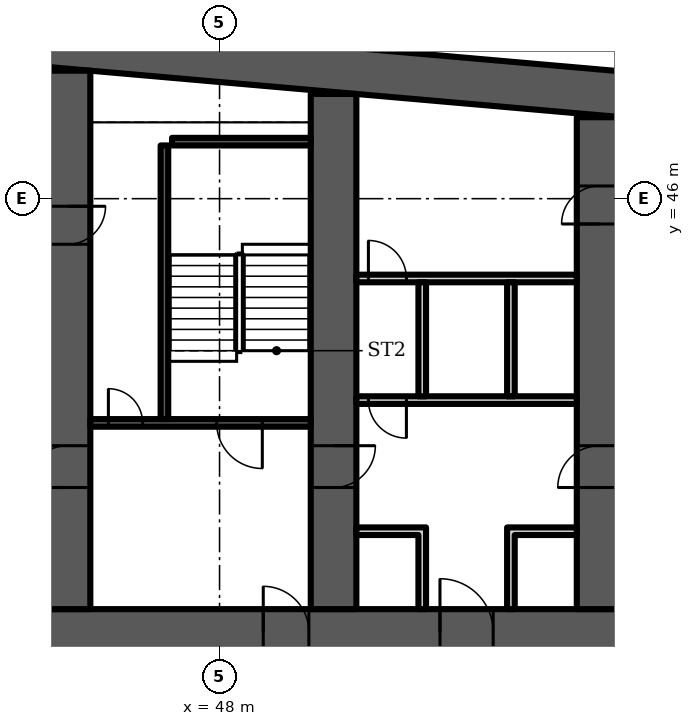
"""IFC4 building model, lengths in metres.
Left out: names, types, materials, properties, quantities, classifications, styles, units other than length and angle.
Written with IfcOpenShell. Run it as: python <this file> out.ifc"""

import sys

from ifc_helpers import new_model, si_unit, direction, frame, frame_2d, origin, place, context, subcontext, project, spatial, polyline, rectangle, outline, extrude, element, fill, save


model = new_model("IFC4")
c1 = context("Model", 3, precision=1e-05, world=origin(), true_north=direction((0.0, 1.0)))
c2 = subcontext(c1, "Body", "Model", "MODEL_VIEW")
j1 = project(units=[si_unit("LENGTHUNIT", "METRE"), si_unit("PLANEANGLEUNIT", "RADIAN")], contexts=[c1])
p1 = place(None, origin())
s1 = spatial("IfcSite", under=j1, at=p1, CompositionType="ELEMENT")
p2 = place(p1, origin())
s2 = spatial("IfcBuilding", under=s1, at=p2, CompositionType="ELEMENT")
p3 = place(p2, frame((0.0, 0.0, 45.1)))
s3 = spatial("IfcBuildingStorey", under=s2, at=p3, CompositionType="ELEMENT", Elevation=45.1)
p4 = place(p3, frame((0.0, 0.0, -0.0)))
e1 = element("IfcWall", 1, at=p4, inside=s3, PredefinedType="SHEAR", context=c2, shape_type="SweptSolid", body=[
    extrude(outline(polyline([(9.0, 47.583), (37.0, 50.032), (65.0, 47.583), (65.0, 48.787), (37.0, 51.237), (9.0, 48.787), (9.0, 47.583)])), origin(), (0.0, 0.0, 1.0), 3.6),
])
p5 = place(p3, frame((9.0, 34.6, 0.0), z_axis=(0.0, 0.0, 1.0), x_axis=(1.0, 0.0, 0.0)))
e2 = element("IfcWall", 2, at=p5, inside=s3, PredefinedType="SHEAR", context=c2, shape_type="SweptSolid", body=[
    extrude(rectangle(XDim=56.0, YDim=1.2, at=frame_2d((28.0, 0.0))), origin(), (0.0, 0.0, 1.0), 3.6),
])
p6 = place(p5, frame((2.0, 0.0, 0.0)))
e3 = element("IfcOpeningElement", 3, at=p6, cuts=e2, PredefinedType="OPENING", context=c2, shape_type="SweptSolid", body=[
    extrude(rectangle(XDim=1.0, YDim=2.1, at=frame_2d((0.5, 1.05))), frame((0.0, 0.61, 0.0), z_axis=(0.0, -1.0, 0.0), x_axis=(1.0, 0.0, 0.0)), (0.0, 0.0, 1.0), 1.22),
])
p7 = place(p5, frame((4.6, 0.0, 0.0)))
e4 = element("IfcOpeningElement", 4, at=p7, cuts=e2, PredefinedType="OPENING", context=c2, shape_type="SweptSolid", body=[
    extrude(rectangle(XDim=1.0, YDim=2.1, at=frame_2d((0.5, 1.05))), frame((0.0, 0.61, 0.0), z_axis=(0.0, -1.0, 0.0), x_axis=(1.0, 0.0, 0.0)), (0.0, 0.0, 1.0), 1.22),
])
p8 = place(p5, frame((7.867, 0.0, 0.0)))
e5 = element("IfcOpeningElement", 5, at=p8, cuts=e2, PredefinedType="OPENING", context=c2, shape_type="SweptSolid", body=[
    extrude(rectangle(XDim=1.1, YDim=2.1, at=frame_2d((0.55, 1.05))), frame((0.0, 0.61, 0.0), z_axis=(0.0, -1.0, 0.0), x_axis=(1.0, 0.0, 0.0)), (0.0, 0.0, 1.0), 1.22),
])
p9 = place(p5, frame((12.033, 0.0, 0.0)))
e6 = element("IfcOpeningElement", 6, at=p9, cuts=e2, PredefinedType="OPENING", context=c2, shape_type="SweptSolid", body=[
    extrude(rectangle(XDim=1.1, YDim=2.1, at=frame_2d((0.55, 1.05))), frame((0.0, 0.61, 0.0), z_axis=(0.0, -1.0, 0.0), x_axis=(1.0, 0.0, 0.0)), (0.0, 0.0, 1.0), 1.22),
])
p10 = place(p5, frame((9.8, 0.0, 0.0)))
e7 = element("IfcOpeningElement", 7, at=p10, cuts=e2, PredefinedType="OPENING", context=c2, shape_type="SweptSolid", body=[
    extrude(rectangle(XDim=1.4, YDim=2.1, at=frame_2d((0.7, 1.05))), frame((0.0, 0.61, 0.0), z_axis=(0.0, -1.0, 0.0), x_axis=(1.0, 0.0, 0.0)), (0.0, 0.0, 1.0), 1.22),
])
p11 = place(p5, frame((14.65, 0.0, 0.0)))
e8 = element("IfcOpeningElement", 8, at=p11, cuts=e2, PredefinedType="OPENING", context=c2, shape_type="SweptSolid", body=[
    extrude(rectangle(XDim=1.2, YDim=2.1, at=frame_2d((0.6, 1.05))), frame((0.0, 0.61, 0.0), z_axis=(0.0, -1.0, 0.0), x_axis=(1.0, 0.0, 0.0)), (0.0, 0.0, 1.0), 1.22),
])
p12 = place(p5, frame((21.867, 0.0, 0.0)))
e9 = element("IfcOpeningElement", 9, at=p12, cuts=e2, PredefinedType="OPENING", context=c2, shape_type="SweptSolid", body=[
    extrude(rectangle(XDim=1.1, YDim=2.1, at=frame_2d((0.55, 1.05))), frame((0.0, 0.61, 0.0), z_axis=(0.0, -1.0, 0.0), x_axis=(1.0, 0.0, 0.0)), (0.0, 0.0, 1.0), 1.22),
])
p13 = place(p5, frame((26.033, 0.0, 0.0)))
e10 = element("IfcOpeningElement", 10, at=p13, cuts=e2, PredefinedType="OPENING", context=c2, shape_type="SweptSolid", body=[
    extrude(rectangle(XDim=1.1, YDim=2.1, at=frame_2d((0.55, 1.05))), frame((0.0, 0.61, 0.0), z_axis=(0.0, -1.0, 0.0), x_axis=(1.0, 0.0, 0.0)), (0.0, 0.0, 1.0), 1.22),
])
p14 = place(p5, frame((23.8, 0.0, 0.0)))
e11 = element("IfcOpeningElement", 11, at=p14, cuts=e2, PredefinedType="OPENING", context=c2, shape_type="SweptSolid", body=[
    extrude(rectangle(XDim=1.4, YDim=2.1, at=frame_2d((0.7, 1.05))), frame((0.0, 0.61, 0.0), z_axis=(0.0, -1.0, 0.0), x_axis=(1.0, 0.0, 0.0)), (0.0, 0.0, 1.0), 1.22),
])
p15 = place(p5, frame((28.867, 0.0, 0.0)))
e12 = element("IfcOpeningElement", 12, at=p15, cuts=e2, PredefinedType="OPENING", context=c2, shape_type="SweptSolid", body=[
    extrude(rectangle(XDim=1.1, YDim=2.1, at=frame_2d((0.55, 1.05))), frame((0.0, 0.61, 0.0), z_axis=(0.0, -1.0, 0.0), x_axis=(1.0, 0.0, 0.0)), (0.0, 0.0, 1.0), 1.22),
])
p16 = place(p5, frame((33.033, 0.0, 0.0)))
e13 = element("IfcOpeningElement", 13, at=p16, cuts=e2, PredefinedType="OPENING", context=c2, shape_type="SweptSolid", body=[
    extrude(rectangle(XDim=1.1, YDim=2.1, at=frame_2d((0.55, 1.05))), frame((0.0, 0.61, 0.0), z_axis=(0.0, -1.0, 0.0), x_axis=(1.0, 0.0, 0.0)), (0.0, 0.0, 1.0), 1.22),
])
p17 = place(p5, frame((40.15, 0.0, 0.0)))
e14 = element("IfcOpeningElement", 14, at=p17, cuts=e2, PredefinedType="OPENING", context=c2, shape_type="SweptSolid", body=[
    extrude(rectangle(XDim=1.2, YDim=2.1, at=frame_2d((0.6, 1.05))), frame((0.0, 0.61, 0.0), z_axis=(0.0, -1.0, 0.0), x_axis=(1.0, 0.0, 0.0)), (0.0, 0.0, 1.0), 1.22),
])
p18 = place(p5, frame((44.8, 0.0, 0.0)))
e15 = element("IfcOpeningElement", 15, at=p18, cuts=e2, PredefinedType="OPENING", context=c2, shape_type="SweptSolid", body=[
    extrude(rectangle(XDim=1.4, YDim=2.1, at=frame_2d((0.7, 1.05))), frame((0.0, 0.61, 0.0), z_axis=(0.0, -1.0, 0.0), x_axis=(1.0, 0.0, 0.0)), (0.0, 0.0, 1.0), 1.22),
])
p19 = place(p5, frame((49.867, 0.0, 0.0)))
e16 = element("IfcOpeningElement", 16, at=p19, cuts=e2, PredefinedType="OPENING", context=c2, shape_type="SweptSolid", body=[
    extrude(rectangle(XDim=1.1, YDim=2.1, at=frame_2d((0.55, 1.05))), frame((0.0, 0.61, 0.0), z_axis=(0.0, -1.0, 0.0), x_axis=(1.0, 0.0, 0.0)), (0.0, 0.0, 1.0), 1.22),
])
p20 = place(p5, frame((53.5, 0.0, 0.0)))
e17 = element("IfcOpeningElement", 17, at=p20, cuts=e2, PredefinedType="OPENING", context=c2, shape_type="SweptSolid", body=[
    extrude(rectangle(XDim=1.1, YDim=2.1, at=frame_2d((0.55, 1.05))), frame((0.0, 0.61, 0.0), z_axis=(0.0, -1.0, 0.0), x_axis=(1.0, 0.0, 0.0)), (0.0, 0.0, 1.0), 1.22),
])
p21 = place(p5, frame((51.567, 0.0, 0.0)))
e18 = element("IfcOpeningElement", 18, at=p21, cuts=e2, PredefinedType="OPENING", context=c2, shape_type="SweptSolid", body=[
    extrude(rectangle(XDim=1.4, YDim=2.1, at=frame_2d((0.7, 1.05))), frame((0.0, 0.61, 0.0), z_axis=(0.0, -1.0, 0.0), x_axis=(1.0, 0.0, 0.0)), (0.0, 0.0, 1.0), 1.22),
])
p22 = place(p3, frame((44.0, 35.2, 0.0), z_axis=(0.0, 0.0, 1.0), x_axis=(0.0, 1.0, 0.0)))
e19 = element("IfcWall", 19, at=p22, inside=s3, PredefinedType="SHEAR", context=c2, shape_type="SweptSolid", body=[
    extrude(rectangle(XDim=14.168, YDim=1.2, at=frame_2d((7.084, 0.0))), origin(), (0.0, 0.0, 1.0), 3.6),
])
p23 = place(p22, frame((3.2, 0.0, 0.0)))
e20 = element("IfcOpeningElement", 20, at=p23, cuts=e19, PredefinedType="OPENING", context=c2, shape_type="SweptSolid", body=[
    extrude(rectangle(XDim=1.1, YDim=2.1, at=frame_2d((0.55, 1.05))), frame((0.0, 0.61, 0.0), z_axis=(0.0, -1.0, 0.0), x_axis=(1.0, 0.0, 0.0)), (0.0, 0.0, 1.0), 1.22),
])
p24 = place(p22, frame((9.6, 0.0, 0.0)))
e21 = element("IfcOpeningElement", 21, at=p24, cuts=e19, PredefinedType="OPENING", context=c2, shape_type="SweptSolid", body=[
    extrude(rectangle(XDim=1.0, YDim=2.1, at=frame_2d((0.5, 1.05))), frame((0.0, 0.61, 0.0), z_axis=(0.0, -1.0, 0.0), x_axis=(1.0, 0.0, 0.0)), (0.0, 0.0, 1.0), 1.22),
])
p25 = place(p3, frame((51.0, 35.2, 0.0), z_axis=(0.0, 0.0, 1.0), x_axis=(0.0, 1.0, 0.0)))
e22 = element("IfcWall", 22, at=p25, inside=s3, PredefinedType="SHEAR", context=c2, shape_type="SweptSolid", body=[
    extrude(rectangle(XDim=13.555, YDim=1.2, at=frame_2d((6.778, 0.0))), origin(), (0.0, 0.0, 1.0), 3.6),
])
p26 = place(p25, frame((3.2, 0.0, 0.0)))
e23 = element("IfcOpeningElement", 23, at=p26, cuts=e22, PredefinedType="OPENING", context=c2, shape_type="SweptSolid", body=[
    extrude(rectangle(XDim=1.1, YDim=2.1, at=frame_2d((0.55, 1.05))), frame((0.0, 0.61, 0.0), z_axis=(0.0, -1.0, 0.0), x_axis=(1.0, 0.0, 0.0)), (0.0, 0.0, 1.0), 1.22),
])
p27 = place(p3, frame((58.0, 35.2, 0.0), z_axis=(0.0, 0.0, 1.0), x_axis=(0.0, 1.0, 0.0)))
e24 = element("IfcWall", 24, at=p27, inside=s3, PredefinedType="SHEAR", context=c2, shape_type="SweptSolid", body=[
    extrude(rectangle(XDim=12.943, YDim=1.2, at=frame_2d((6.471, 0.0))), origin(), (0.0, 0.0, 1.0), 3.6),
])
p28 = place(p27, frame((10.134, 0.0, 0.0)))
e25 = element("IfcOpeningElement", 25, at=p28, cuts=e24, PredefinedType="OPENING", context=c2, shape_type="SweptSolid", body=[
    extrude(rectangle(XDim=1.0, YDim=2.1, at=frame_2d((0.5, 1.05))), frame((0.0, 0.61, 0.0), z_axis=(0.0, -1.0, 0.0), x_axis=(1.0, 0.0, 0.0)), (0.0, 0.0, 1.0), 1.22),
])
p29 = place(p27, frame((3.2, 0.0, 0.0)))
e26 = element("IfcOpeningElement", 26, at=p29, cuts=e24, PredefinedType="OPENING", context=c2, shape_type="SweptSolid", body=[
    extrude(rectangle(XDim=1.1, YDim=2.1, at=frame_2d((0.55, 1.05))), frame((0.0, 0.61, 0.0), z_axis=(0.0, -1.0, 0.0), x_axis=(1.0, 0.0, 0.0)), (0.0, 0.0, 1.0), 1.22),
])
p30 = place(p3, frame((44.6, 40.1, 0.0), z_axis=(0.0, 0.0, 1.0), x_axis=(1.0, 0.0, 0.0)))
e27 = element("IfcWall", 27, at=p30, inside=s3, PredefinedType="SHEAR", context=c2, shape_type="SweptSolid", body=[
    extrude(rectangle(XDim=5.8, YDim=0.2, at=frame_2d((2.9, 0.0))), origin(), (0.0, 0.0, 1.0), 3.2),
])
p31 = place(p30, frame((3.325, 0.0, 0.0)))
e28 = element("IfcOpeningElement", 28, at=p31, cuts=e27, PredefinedType="OPENING", context=c2, shape_type="SweptSolid", body=[
    extrude(rectangle(XDim=1.2, YDim=2.1, at=frame_2d((0.6, 1.05))), frame((0.0, 0.11, 0.0), z_axis=(0.0, -1.0, 0.0), x_axis=(1.0, 0.0, 0.0)), (0.0, 0.0, 1.0), 0.22),
])
p32 = place(p30, frame((0.475, 0.0, 0.0)))
e29 = element("IfcOpeningElement", 29, at=p32, cuts=e27, PredefinedType="OPENING", context=c2, shape_type="SweptSolid", body=[
    extrude(rectangle(XDim=0.9, YDim=2.1, at=frame_2d((0.45, 1.05))), frame((0.0, 0.11, 0.0), z_axis=(0.0, -1.0, 0.0), x_axis=(1.0, 0.0, 0.0)), (0.0, 0.0, 1.0), 0.22),
])
p33 = place(p3, frame((46.55, 40.2, 0.0), z_axis=(0.0, 0.0, 1.0), x_axis=(0.0, 1.0, 0.0)))
e30 = element("IfcWall", 30, at=p33, inside=s3, PredefinedType="SHEAR", context=c2, shape_type="SweptSolid", body=[
    extrude(rectangle(XDim=7.2, YDim=0.2, at=frame_2d((3.6, 0.0))), origin(), (0.0, 0.0, 1.0), 3.2),
])
p34 = place(p3, frame((46.75, 47.5, 0.0), z_axis=(0.0, 0.0, 1.0), x_axis=(1.0, 0.0, 0.0)))
e31 = element("IfcWall", 31, at=p34, inside=s3, PredefinedType="SHEAR", context=c2, shape_type="SweptSolid", body=[
    extrude(rectangle(XDim=3.65, YDim=0.2, at=frame_2d((1.825, 0.0))), origin(), (0.0, 0.0, 1.0), 3.2),
])
p35 = place(p3, frame((51.6, 40.7, 0.0), z_axis=(0.0, 0.0, 1.0), x_axis=(1.0, 0.0, 0.0)))
e32 = element("IfcWall", 32, at=p35, inside=s3, PredefinedType="PARTITIONING", context=c2, shape_type="SweptSolid", body=[
    extrude(rectangle(XDim=5.8, YDim=0.2, at=frame_2d((2.9, 0.0))), origin(), (0.0, 0.0, 1.0), 3.2),
])
p36 = place(p35, frame((0.317, 0.0, 0.0)))
e33 = element("IfcOpeningElement", 33, at=p36, cuts=e32, PredefinedType="OPENING", context=c2, shape_type="SweptSolid", body=[
    extrude(rectangle(XDim=1.0, YDim=2.1, at=frame_2d((0.5, 1.05))), frame((0.0, 0.11, 0.0), z_axis=(0.0, -1.0, 0.0), x_axis=(1.0, 0.0, 0.0)), (0.0, 0.0, 1.0), 0.22),
])
p37 = place(p3, frame((51.6, 43.9, 0.0), z_axis=(0.0, 0.0, 1.0), x_axis=(1.0, 0.0, 0.0)))
e34 = element("IfcWall", 34, at=p37, inside=s3, PredefinedType="PARTITIONING", context=c2, shape_type="SweptSolid", body=[
    extrude(rectangle(XDim=5.8, YDim=0.2, at=frame_2d((2.9, 0.0))), origin(), (0.0, 0.0, 1.0), 3.2),
])
p38 = place(p37, frame((0.317, 0.0, 0.0)))
e35 = element("IfcOpeningElement", 35, at=p38, cuts=e34, PredefinedType="OPENING", context=c2, shape_type="SweptSolid", body=[
    extrude(rectangle(XDim=1.0, YDim=2.1, at=frame_2d((0.5, 1.05))), frame((0.0, 0.11, 0.0), z_axis=(0.0, -1.0, 0.0), x_axis=(1.0, 0.0, 0.0)), (0.0, 0.0, 1.0), 0.22),
])
p39 = place(p3, frame((0.0, 0.0, -0.0)))
e36 = element("IfcWall", 36, at=p39, inside=s3, PredefinedType="PARTITIONING", context=c2, shape_type="SweptSolid", body=[
    extrude(outline(polyline([(53.233, 37.15), (51.6, 37.15), (51.6, 37.35), (53.233, 37.35), (53.433, 37.35), (53.433, 35.2), (53.233, 35.2), (53.233, 37.15)])), origin(), (0.0, 0.0, 1.0), 3.2),
])
p40 = place(p3, frame((0.0, 0.0, -0.0)))
e37 = element("IfcWall", 37, at=p40, inside=s3, PredefinedType="PARTITIONING", context=c2, shape_type="SweptSolid", body=[
    extrude(outline(polyline([(55.567, 37.35), (55.767, 37.35), (57.4, 37.35), (57.4, 37.15), (55.767, 37.15), (55.767, 35.2), (55.567, 35.2), (55.567, 37.35)])), origin(), (0.0, 0.0, 1.0), 3.2),
])
p41 = place(p3, frame((0.0, 0.0, -0.0)))
e38 = element("IfcWall", 38, at=p41, inside=s3, PredefinedType="PARTITIONING", context=c2, shape_type="SweptSolid", body=[
    extrude(outline(polyline([(53.233, 40.8), (53.233, 43.8), (53.433, 43.8), (53.433, 40.8), (53.233, 40.8)])), origin(), (0.0, 0.0, 1.0), 3.2),
])
p42 = place(p3, frame((0.0, 0.0, -0.0)))
e39 = element("IfcWall", 39, at=p42, inside=s3, PredefinedType="PARTITIONING", context=c2, shape_type="SweptSolid", body=[
    extrude(outline(polyline([(55.567, 40.8), (55.567, 43.8), (55.767, 43.8), (55.767, 40.8), (55.567, 40.8)])), origin(), (0.0, 0.0, 1.0), 3.2),
])
p43 = place(p31, origin())
e40 = element("IfcDoor", 40, at=p43, inside=s3, OperationType="SINGLE_SWING_RIGHT", PredefinedType="DOOR", context=c2, shape_type="SweptSolid", body=[
    extrude(rectangle(XDim=1.2, YDim=2.1, at=frame_2d((0.6, 1.05))), frame((0.0, 0.025, 0.0), z_axis=(0.0, -1.0, 0.0), x_axis=(1.0, 0.0, 0.0)), (0.0, 0.0, 1.0), 0.05),
])
fill(e28, e40)
p44 = place(p32, origin())
e41 = element("IfcDoor", 41, at=p44, inside=s3, OperationType="SINGLE_SWING_LEFT", PredefinedType="DOOR", context=c2, shape_type="SweptSolid", body=[
    extrude(rectangle(XDim=0.9, YDim=2.1, at=frame_2d((0.45, 1.05))), frame((0.0, 0.025, 0.0), z_axis=(0.0, -1.0, 0.0), x_axis=(1.0, 0.0, 0.0)), (0.0, 0.0, 1.0), 0.05),
])
fill(e29, e41)
p45 = place(p17, origin())
e42 = element("IfcDoor", 42, at=p45, inside=s3, OperationType="SINGLE_SWING_LEFT", PredefinedType="DOOR", context=c2, shape_type="SweptSolid", body=[
    extrude(rectangle(XDim=1.2, YDim=2.1, at=frame_2d((0.6, 1.05))), frame((0.0, 0.025, 0.0), z_axis=(0.0, -1.0, 0.0), x_axis=(1.0, 0.0, 0.0)), (0.0, 0.0, 1.0), 0.05),
])
fill(e14, e42)
p46 = place(p18, origin())
e43 = element("IfcDoor", 43, at=p46, inside=s3, OperationType="DOUBLE_DOOR_SINGLE_SWING", PredefinedType="DOOR", context=c2, shape_type="SweptSolid", body=[
    extrude(rectangle(XDim=1.4, YDim=2.1, at=frame_2d((0.7, 1.05))), frame((0.0, 0.025, 0.0), z_axis=(0.0, -1.0, 0.0), x_axis=(1.0, 0.0, 0.0)), (0.0, 0.0, 1.0), 0.05),
])
fill(e15, e43)
p47 = place(p36, origin())
e44 = element("IfcDoor", 44, at=p47, inside=s3, OperationType="SINGLE_SWING_RIGHT", PredefinedType="DOOR", context=c2, shape_type="SweptSolid", body=[
    extrude(rectangle(XDim=1.0, YDim=2.1, at=frame_2d((0.5, 1.05))), frame((0.0, 0.025, 0.0), z_axis=(0.0, -1.0, 0.0), x_axis=(1.0, 0.0, 0.0)), (0.0, 0.0, 1.0), 0.05),
])
fill(e33, e44)
p48 = place(p38, origin())
e45 = element("IfcDoor", 45, at=p48, inside=s3, OperationType="SINGLE_SWING_LEFT", PredefinedType="DOOR", context=c2, shape_type="SweptSolid", body=[
    extrude(rectangle(XDim=1.0, YDim=2.1, at=frame_2d((0.5, 1.05))), frame((0.0, 0.025, 0.0), z_axis=(0.0, -1.0, 0.0), x_axis=(1.0, 0.0, 0.0)), (0.0, 0.0, 1.0), 0.05),
])
fill(e35, e45)
p49 = place(p28, origin())
e46 = element("IfcDoor", 46, at=p49, inside=s3, OperationType="SINGLE_SWING_LEFT", PredefinedType="DOOR", context=c2, shape_type="SweptSolid", body=[
    extrude(rectangle(XDim=1.0, YDim=2.1, at=frame_2d((0.5, 1.05))), frame((0.0, 0.6, 0.0), z_axis=(0.0, -1.0, 0.0), x_axis=(1.0, 0.0, 0.0)), (0.0, 0.0, 1.0), 1.199),
])
fill(e25, e46)
p50 = place(p23, origin())
e47 = element("IfcDoor", 47, at=p50, inside=s3, OperationType="SINGLE_SWING_LEFT", PredefinedType="DOOR", context=c2, shape_type="SweptSolid", body=[
    extrude(rectangle(XDim=1.1, YDim=2.1, at=frame_2d((0.55, 1.05))), frame((0.0, 0.025, 0.0), z_axis=(0.0, -1.0, 0.0), x_axis=(1.0, 0.0, 0.0)), (0.0, 0.0, 1.0), 0.05),
])
fill(e20, e47)
p51 = place(p24, origin())
e48 = element("IfcDoor", 48, at=p51, inside=s3, OperationType="SINGLE_SWING_RIGHT", PredefinedType="DOOR", context=c2, shape_type="SweptSolid", body=[
    extrude(rectangle(XDim=1.0, YDim=2.1, at=frame_2d((0.5, 1.05))), frame((0.0, 0.6, 0.0), z_axis=(0.0, -1.0, 0.0), x_axis=(1.0, 0.0, 0.0)), (0.0, 0.0, 1.0), 1.199),
])
fill(e21, e48)
p52 = place(p26, origin())
e49 = element("IfcDoor", 49, at=p52, inside=s3, OperationType="SINGLE_SWING_RIGHT", PredefinedType="DOOR", context=c2, shape_type="SweptSolid", body=[
    extrude(rectangle(XDim=1.1, YDim=2.1, at=frame_2d((0.55, 1.05))), frame((0.0, 0.025, 0.0), z_axis=(0.0, -1.0, 0.0), x_axis=(1.0, 0.0, 0.0)), (0.0, 0.0, 1.0), 0.05),
])
fill(e23, e49)
p53 = place(p29, origin())
e50 = element("IfcDoor", 50, at=p53, inside=s3, OperationType="SINGLE_SWING_LEFT", PredefinedType="DOOR", context=c2, shape_type="SweptSolid", body=[
    extrude(rectangle(XDim=1.1, YDim=2.1, at=frame_2d((0.55, 1.05))), frame((0.0, 0.025, 0.0), z_axis=(0.0, -1.0, 0.0), x_axis=(1.0, 0.0, 0.0)), (0.0, 0.0, 1.0), 0.05),
])
fill(e26, e50)
save(model, sys.argv[1])
